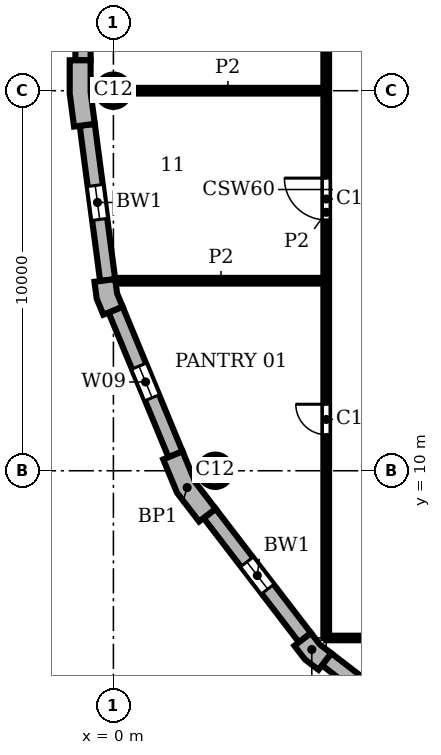
"""IFC4 building model, lengths in metres.
Left out: names, types, materials, properties, quantities, classifications, styles, units other than length and angle.
Written with IfcOpenShell. Run it as: python <this file> out.ifc"""

import sys

from ifc_helpers import new_model, si_unit, direction, frame, frame_2d, origin, origin_2d, place, context, subcontext, project, spatial, polyline, rectangle, circle, outline, extrude, element, fill, save


model = new_model("IFC4")
c1 = context("Model", 3, precision=1e-05, world=origin(), true_north=direction((0.0, 1.0)))
c2 = subcontext(c1, "Body", "Model", "MODEL_VIEW")
j1 = project(units=[si_unit("LENGTHUNIT", "METRE"), si_unit("PLANEANGLEUNIT", "RADIAN")], contexts=[c1])
p1 = place(None, origin())
s1 = spatial("IfcSite", under=j1, at=p1, CompositionType="ELEMENT")
p2 = place(p1, origin())
s2 = spatial("IfcBuilding", under=s1, at=p2, CompositionType="ELEMENT")
p3 = place(p2, frame((0.0, 0.0, 341.1)))
s3 = spatial("IfcBuildingStorey", under=s2, at=p3, CompositionType="ELEMENT", Elevation=341.1)
for number, where, z_axis, x_axis in (
    (1, (0.0, 20.0, 0.0), (0.0, 0.0, 1.0), (1.0, 0.0, 0.0)),
    (2, (2.679, 10.0, 0.0), (0.0, 0.0, 1.0), (1.0, 0.0, 0.0)),
):
    element("IfcColumn", number, at=place(p3, frame(where, z_axis=z_axis, x_axis=x_axis)), inside=s3, PredefinedType="COLUMN", context=c2, shape_type="SweptSolid", body=[
        extrude(circle(Radius=0.425, at=origin_2d()), origin(), (0.0, 0.0, 1.0), 3.9),
    ])
p4 = place(p3, origin())
e3 = element("IfcWall", 3, at=p4, inside=s3, PredefinedType="SOLIDWALL", context=c2, shape_type="SweptSolid", body=[
    extrude(outline(polyline([(-1.0, 20.8), (-1.15, 20.8), (-1.15, 19.925), (-1.036, 19.057), (-0.887, 19.076), (-0.49, 19.128), (-0.6, 19.961), (-0.6, 20.8), (-1.0, 20.8)])), origin(), (0.0, 0.0, 1.0), 3.9),
])
e4 = element("IfcWall", 4, at=p4, inside=s3, PredefinedType="SOLIDWALL", context=c2, shape_type="SweptSolid", body=[
    extrude(outline(polyline([(-0.349, 14.99), (-0.498, 14.971), (-0.439, 14.523), (-0.266, 14.106), (-0.128, 14.164), (0.242, 14.317), (0.097, 14.667), (0.047, 15.043), (-0.349, 14.99)])), origin(), (0.0, 0.0, 1.0), 3.9),
])
e5 = element("IfcWall", 5, at=p4, inside=s3, PredefinedType="SOLIDWALL", context=c2, shape_type="SweptSolid", body=[
    extrude(outline(polyline([(1.449, 10.356), (1.311, 10.299), (1.675, 9.42), (2.254, 8.665), (2.373, 8.757), (2.69, 9.0), (2.155, 9.698), (1.819, 10.51), (1.449, 10.356)])), origin(), (0.0, 0.0, 1.0), 3.9),
])
e6 = element("IfcWall", 6, at=p4, inside=s3, PredefinedType="SOLIDWALL", context=c2, shape_type="SweptSolid", body=[
    extrude(outline(polyline([(4.882, 5.487), (4.763, 5.396), (5.038, 5.038), (5.396, 4.763), (5.487, 4.882), (5.731, 5.199), (5.43, 5.43), (5.199, 5.731), (4.882, 5.487)])), origin(), (0.0, 0.0, 1.0), 3.9),
])
p5 = place(p3, frame((-0.8, 39.2, 0.0), z_axis=(0.0, 0.0, 1.0), x_axis=(0.0, -1.0, 0.0)))
e7 = element("IfcWall", 7, at=p5, inside=s3, PredefinedType="SOLIDWALL", context=c2, shape_type="SweptSolid", body=[
    extrude(rectangle(XDim=18.4, YDim=0.4, at=frame_2d((9.2, 0.0))), origin(), (0.0, 0.0, 1.0), 3.9),
])
p6 = place(p5, frame((3.75, 0.0, 0.9)))
e8 = element("IfcOpeningElement", 8, at=p6, cuts=e7, PredefinedType="OPENING", context=c2, shape_type="SweptSolid", body=[
    extrude(rectangle(XDim=0.9, YDim=2.35, at=frame_2d((0.45, 1.175))), frame((0.0, 0.21, 0.0), z_axis=(0.0, -1.0, 0.0), x_axis=(1.0, 0.0, 0.0)), (0.0, 0.0, 1.0), 0.42),
])
p7 = place(p5, frame((13.75, 0.0, 0.9)))
e9 = element("IfcOpeningElement", 9, at=p7, cuts=e7, PredefinedType="OPENING", context=c2, shape_type="SweptSolid", body=[
    extrude(rectangle(XDim=0.9, YDim=2.35, at=frame_2d((0.45, 1.175))), frame((0.0, 0.21, 0.0), z_axis=(0.0, -1.0, 0.0), x_axis=(1.0, 0.0, 0.0)), (0.0, 0.0, 1.0), 0.42),
])
p8 = place(p3, frame((-0.689, 19.102, 0.0), z_axis=(0.0, 0.0, 1.0), x_axis=(0.130514280502, -0.991446429508, 0.0)))
e10 = element("IfcWall", 10, at=p8, inside=s3, PredefinedType="SOLIDWALL", context=c2, shape_type="SweptSolid", body=[
    extrude(rectangle(XDim=4.121, YDim=0.4, at=frame_2d((2.061, 0.0))), origin(), (0.0, 0.0, 1.0), 3.9),
])
p9 = place(p8, frame((1.611, 0.0, 0.9)))
e11 = element("IfcOpeningElement", 11, at=p9, cuts=e10, PredefinedType="OPENING", context=c2, shape_type="SweptSolid", body=[
    extrude(rectangle(XDim=0.9, YDim=2.35, at=frame_2d((0.45, 1.175))), frame((0.0, 0.21, 0.0), z_axis=(0.0, -1.0, 0.0), x_axis=(1.0, 0.0, 0.0)), (0.0, 0.0, 1.0), 0.42),
])
p10 = place(p3, frame((0.057, 14.24, 0.0), z_axis=(0.0, 0.0, 1.0), x_axis=(0.382721546029, -0.923863744394, 0.0)))
e12 = element("IfcWall", 12, at=p10, inside=s3, PredefinedType="SOLIDWALL", context=c2, shape_type="SweptSolid", body=[
    extrude(rectangle(XDim=4.121, YDim=0.4, at=frame_2d((2.061, 0.0))), origin(), (0.0, 0.0, 1.0), 3.9),
])
p11 = place(p10, frame((1.611, 0.0, 0.9)))
e13 = element("IfcOpeningElement", 13, at=p11, cuts=e12, PredefinedType="OPENING", context=c2, shape_type="SweptSolid", body=[
    extrude(rectangle(XDim=0.9, YDim=2.35, at=frame_2d((0.45, 1.175))), frame((0.0, 0.21, 0.0), z_axis=(0.0, -1.0, 0.0), x_axis=(1.0, 0.0, 0.0)), (0.0, 0.0, 1.0), 0.42),
])
p12 = place(p3, frame((2.532, 8.878, 0.0), z_axis=(0.0, 0.0, 1.0), x_axis=(0.608759824817, -0.793354571229, 0.0)))
e14 = element("IfcWall", 14, at=p12, inside=s3, PredefinedType="SOLIDWALL", context=c2, shape_type="SweptSolid", body=[
    extrude(rectangle(XDim=4.121, YDim=0.4, at=frame_2d((2.061, 0.0))), origin(), (0.0, 0.0, 1.0), 3.9),
])
p13 = place(p12, frame((1.611, 0.0, 0.9)))
e15 = element("IfcOpeningElement", 15, at=p13, cuts=e14, PredefinedType="OPENING", context=c2, shape_type="SweptSolid", body=[
    extrude(rectangle(XDim=0.9, YDim=2.35, at=frame_2d((0.45, 1.175))), frame((0.0, 0.21, 0.0), z_axis=(0.0, -1.0, 0.0), x_axis=(1.0, 0.0, 0.0)), (0.0, 0.0, 1.0), 0.42),
])
p14 = place(p3, frame((5.609, 5.041, 0.0), z_axis=(0.0, 0.0, 1.0), x_axis=(0.793354571229, -0.608759824817, 0.0)))
e16 = element("IfcWall", 16, at=p14, inside=s3, PredefinedType="SOLIDWALL", context=c2, shape_type="SweptSolid", body=[
    extrude(rectangle(XDim=4.121, YDim=0.4, at=frame_2d((2.061, 0.0))), origin(), (0.0, 0.0, 1.0), 3.9),
])
p15 = place(p14, frame((1.611, 0.0, 0.9)))
e17 = element("IfcOpeningElement", 17, at=p15, cuts=e16, PredefinedType="OPENING", context=c2, shape_type="SweptSolid", body=[
    extrude(rectangle(XDim=0.9, YDim=2.35, at=frame_2d((0.45, 1.175))), frame((0.0, 0.21, 0.0), z_axis=(0.0, -1.0, 0.0), x_axis=(1.0, 0.0, 0.0)), (0.0, 0.0, 1.0), 0.42),
])
p16 = place(p3, frame((5.6, 5.6, 0.0), z_axis=(0.0, 0.0, 1.0), x_axis=(0.0, 1.0, 0.0)))
e18 = element("IfcWall", 18, at=p16, inside=s3, PredefinedType="PARTITIONING", context=c2, shape_type="SweptSolid", body=[
    extrude(rectangle(XDim=22.4, YDim=0.15, at=frame_2d((11.2, 0.0))), origin(), (0.0, 0.0, 1.0), 3.58),
])
p17 = place(p16, frame((5.35, 0.0, 0.0)))
e19 = element("IfcOpeningElement", 19, at=p17, cuts=e18, PredefinedType="OPENING", context=c2, shape_type="SweptSolid", body=[
    extrude(rectangle(XDim=0.8, YDim=2.1, at=frame_2d((0.4, 1.05))), frame((0.0, 0.085, 0.0), z_axis=(0.0, -1.0, 0.0), x_axis=(1.0, 0.0, 0.0)), (0.0, 0.0, 1.0), 0.17),
])
p18 = place(p16, frame((11.0, 0.0, 0.0)))
e20 = element("IfcOpeningElement", 20, at=p18, cuts=e18, PredefinedType="OPENING", context=c2, shape_type="SweptSolid", body=[
    extrude(rectangle(XDim=1.1, YDim=2.1, at=frame_2d((0.55, 1.05))), frame((0.0, 0.085, 0.0), z_axis=(0.0, -1.0, 0.0), x_axis=(1.0, 0.0, 0.0)), (0.0, 0.0, 1.0), 0.17),
])
p19 = place(p3, frame((0.063, 15.0, 0.0), z_axis=(0.0, 0.0, 1.0), x_axis=(1.0, 0.0, 0.0)))
e21 = element("IfcWall", 21, at=p19, inside=s3, PredefinedType="PARTITIONING", context=c2, shape_type="SweptSolid", body=[
    extrude(rectangle(XDim=5.537, YDim=0.15, at=frame_2d((2.769, 0.0))), origin(), (0.0, 0.0, 1.0), 3.58),
])
p20 = place(p3, frame((0.425, 20.0, 0.0), z_axis=(0.0, 0.0, 1.0), x_axis=(1.0, 0.0, 0.0)))
e22 = element("IfcWall", 22, at=p20, inside=s3, PredefinedType="PARTITIONING", context=c2, shape_type="SweptSolid", body=[
    extrude(rectangle(XDim=5.175, YDim=0.15, at=frame_2d((2.587, 0.0))), origin(), (0.0, 0.0, 1.0), 3.58),
])
p21 = place(p3, frame((5.6, 5.6, 0.0), z_axis=(0.0, 0.0, 1.0), x_axis=(1.0, 0.0, 0.0)))
e23 = element("IfcWall", 23, at=p21, inside=s3, PredefinedType="PARTITIONING", context=c2, shape_type="SweptSolid", body=[
    extrude(rectangle(XDim=25.4, YDim=0.12, at=frame_2d((12.7, 0.0))), origin(), (0.0, 0.0, 1.0), 3.58),
])
p22 = place(p21, frame((14.1, 0.0, 0.0)))
e24 = element("IfcOpeningElement", 24, at=p22, cuts=e23, PredefinedType="OPENING", context=c2, shape_type="SweptSolid", body=[
    extrude(rectangle(XDim=1.8, YDim=2.1, at=frame_2d((0.9, 1.05))), frame((0.0, 0.07, 0.0), z_axis=(0.0, -1.0, 0.0), x_axis=(1.0, 0.0, 0.0)), (0.0, 0.0, 1.0), 0.14),
])
p23 = place(p9, origin())
e25 = element("IfcWindow", 25, at=p23, inside=s3, PartitioningType="SINGLE_PANEL", PredefinedType="WINDOW", context=c2, shape_type="SweptSolid", body=[
    extrude(rectangle(XDim=0.9, YDim=2.35, at=frame_2d((0.45, 1.175))), frame((0.0, 0.16, 0.0), z_axis=(0.0, -1.0, 0.0), x_axis=(1.0, 0.0, 0.0)), (0.0, 0.0, 1.0), 0.06),
])
fill(e11, e25)
p24 = place(p11, origin())
e26 = element("IfcWindow", 26, at=p24, inside=s3, PartitioningType="SINGLE_PANEL", PredefinedType="WINDOW", context=c2, shape_type="SweptSolid", body=[
    extrude(rectangle(XDim=0.9, YDim=2.35, at=frame_2d((0.45, 1.175))), frame((0.0, 0.16, 0.0), z_axis=(0.0, -1.0, 0.0), x_axis=(1.0, 0.0, 0.0)), (0.0, 0.0, 1.0), 0.06),
])
fill(e13, e26)
p25 = place(p13, origin())
e27 = element("IfcWindow", 27, at=p25, inside=s3, PartitioningType="SINGLE_PANEL", PredefinedType="WINDOW", context=c2, shape_type="SweptSolid", body=[
    extrude(rectangle(XDim=0.9, YDim=2.35, at=frame_2d((0.45, 1.175))), frame((0.0, 0.16, 0.0), z_axis=(0.0, -1.0, 0.0), x_axis=(1.0, 0.0, 0.0)), (0.0, 0.0, 1.0), 0.06),
])
fill(e15, e27)
p26 = place(p17, origin())
e28 = element("IfcDoor", 28, at=p26, inside=s3, OperationType="SINGLE_SWING_RIGHT", PredefinedType="DOOR", context=c2, shape_type="SweptSolid", body=[
    extrude(rectangle(XDim=0.8, YDim=2.1, at=frame_2d((0.4, 1.05))), frame((0.0, 0.025, 0.0), z_axis=(0.0, -1.0, 0.0), x_axis=(1.0, 0.0, 0.0)), (0.0, 0.0, 1.0), 0.05),
])
fill(e19, e28)
p27 = place(p18, origin())
e29 = element("IfcDoor", 29, at=p27, inside=s3, OperationType="SINGLE_SWING_RIGHT", PredefinedType="DOOR", context=c2, shape_type="SweptSolid", body=[
    extrude(rectangle(XDim=1.1, YDim=2.1, at=frame_2d((0.55, 1.05))), frame((0.0, 0.025, 0.0), z_axis=(0.0, -1.0, 0.0), x_axis=(1.0, 0.0, 0.0)), (0.0, 0.0, 1.0), 0.05),
])
fill(e20, e29)
save(model, sys.argv[1])
